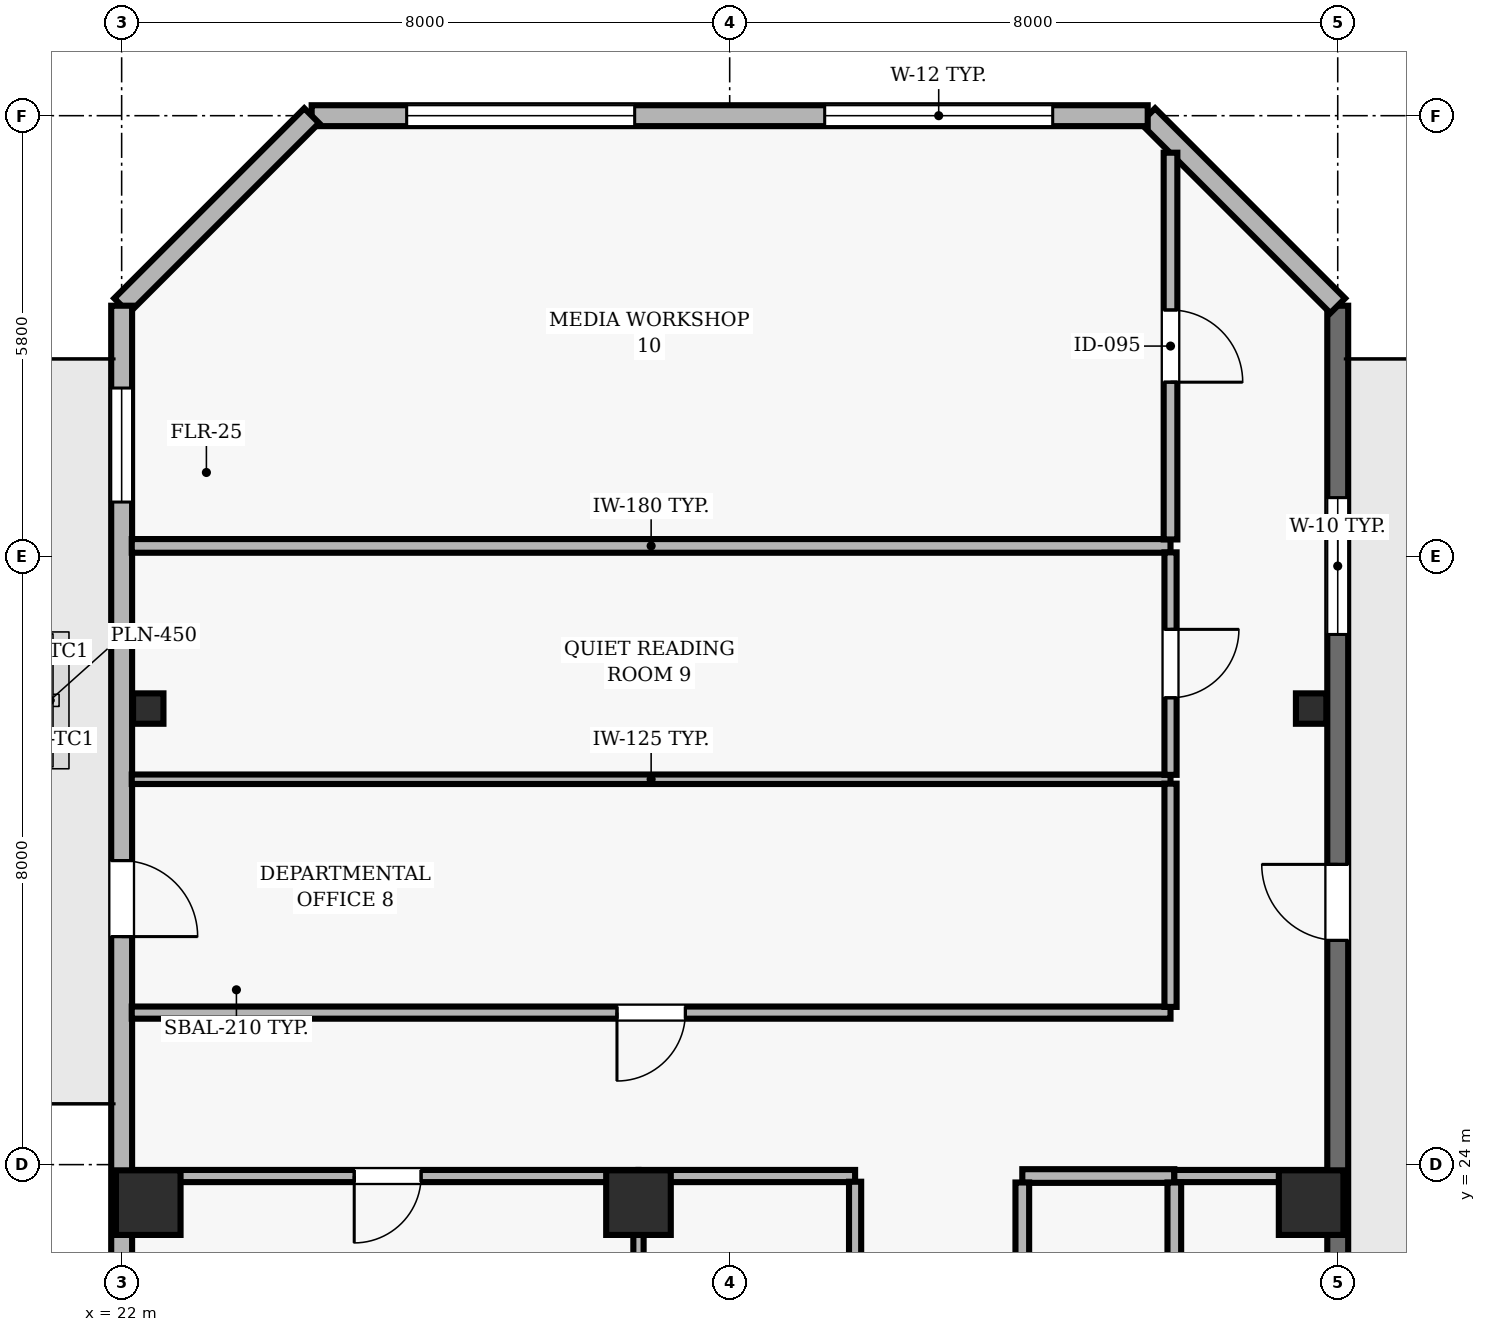
"""IFC4 building model, lengths in metres.
Left out: names, types, materials, properties, quantities, classifications, styles, units other than length and angle.
Written with IfcOpenShell. Run it as: python <this file> out.ifc"""

import sys

from ifc_helpers import new_model, si_unit, direction, frame, frame_2d, origin, origin_2d, place, context, subcontext, project, spatial, rectangle, hollow_rectangle, extrude, element, fill, save


model = new_model("IFC4")
c1 = context("Model", 3, precision=1e-05, world=origin(), true_north=direction((0.0, 1.0)))
c2 = subcontext(c1, "Body", "Model", "MODEL_VIEW")
j1 = project(units=[si_unit("LENGTHUNIT", "METRE"), si_unit("PLANEANGLEUNIT", "RADIAN")], contexts=[c1])
p1 = place(None, origin())
s1 = spatial("IfcSite", under=j1, at=p1, CompositionType="ELEMENT")
p2 = place(p1, origin())
s2 = spatial("IfcBuilding", under=s1, at=p2, CompositionType="ELEMENT")
p3 = place(p2, frame((0.0, 0.0, 298.9)))
s3 = spatial("IfcBuildingStorey", under=s2, at=p3, CompositionType="ELEMENT", Elevation=298.9)
for number, where, z_axis, x_axis in (
    (1, (22.35, 23.5, 0.0), (0.0, 0.0, 1.0), (1.0, 0.0, 0.0)),
    (2, (28.8, 23.5, 0.0), (0.0, 0.0, 1.0), (1.0, 0.0, 0.0)),
    (3, (37.65, 23.5, 0.0), (0.0, 0.0, 1.0), (1.0, 0.0, 0.0)),
):
    element("IfcColumn", number, at=place(p3, frame(where, z_axis=z_axis, x_axis=x_axis)), inside=s3, PredefinedType="COLUMN", context=c2, shape_type="SweptSolid", body=[
        extrude(rectangle(XDim=0.85, YDim=0.85, at=origin_2d()), origin(), (0.0, 0.0, 1.0), 3.9),
    ])
for number, where, z_axis, x_axis in (
    (4, (22.35, 30.0, 0.0), (0.0, 0.0, 1.0), (1.0, 0.0, 0.0)),
    (5, (37.65, 30.0, 0.0), (0.0, 0.0, 1.0), (1.0, 0.0, 0.0)),
):
    element("IfcColumn", number, at=place(p3, frame(where, z_axis=z_axis, x_axis=x_axis)), inside=s3, PredefinedType="COLUMN", context=c2, shape_type="SweptSolid", body=[
        extrude(hollow_rectangle(XDim=0.4, YDim=0.4, WallThickness=0.02, at=origin_2d()), origin(), (0.0, 0.0, 1.0), 3.9),
    ])
p4 = place(p3, frame((38.0, 21.6, 0.0), z_axis=(0.0, 0.0, 1.0), x_axis=(0.0, 1.0, 0.0)))
e6 = element("IfcWall", 6, at=p4, inside=s3, PredefinedType="SOLIDWALL", context=c2, shape_type="SweptSolid", body=[
    extrude(rectangle(XDim=13.7, YDim=0.275, at=frame_2d((6.85, 0.0))), origin(), (0.0, 0.0, 1.0), 3.69),
])
p5 = place(p4, frame((5.35, 0.0, 0.0)))
e7 = element("IfcOpeningElement", 7, at=p5, cuts=e6, PredefinedType="OPENING", context=c2, shape_type="SweptSolid", body=[
    extrude(rectangle(XDim=1.0, YDim=2.2, at=frame_2d((0.5, 1.1))), frame((0.0, 0.147, 0.0), z_axis=(0.0, -1.0, 0.0), x_axis=(1.0, 0.0, 0.0)), (0.0, 0.0, 1.0), 0.295),
])
p6 = place(p4, frame((9.375, 0.0, 0.9)))
e8 = element("IfcOpeningElement", 8, at=p6, cuts=e6, PredefinedType="OPENING", context=c2, shape_type="SweptSolid", body=[
    extrude(rectangle(XDim=1.8, YDim=2.2, at=frame_2d((0.9, 1.1))), frame((0.0, 0.147, 0.0), z_axis=(0.0, -1.0, 0.0), x_axis=(1.0, 0.0, 0.0)), (0.0, 0.0, 1.0), 0.295),
])
p7 = place(p3, frame((38.0, 35.3, 0.0), z_axis=(0.0, 0.0, 1.0), x_axis=(-0.707106781187, 0.707106781187, 0.0)))
e9 = element("IfcWall", 9, at=p7, inside=s3, PredefinedType="SOLIDWALL", context=c2, shape_type="SweptSolid", body=[
    extrude(rectangle(XDim=3.536, YDim=0.275, at=frame_2d((1.768, 0.0))), origin(), (0.0, 0.0, 1.0), 3.69),
])
p8 = place(p3, frame((35.5, 37.8, 0.0), z_axis=(0.0, 0.0, 1.0), x_axis=(-1.0, 0.0, 0.0)))
e10 = element("IfcWall", 10, at=p8, inside=s3, PredefinedType="SOLIDWALL", context=c2, shape_type="SweptSolid", body=[
    extrude(rectangle(XDim=11.0, YDim=0.275, at=frame_2d((5.5, 0.0))), origin(), (0.0, 0.0, 1.0), 3.69),
])
p9 = place(p8, frame((1.25, 0.0, 0.9)))
e11 = element("IfcOpeningElement", 11, at=p9, cuts=e10, PredefinedType="OPENING", context=c2, shape_type="SweptSolid", body=[
    extrude(rectangle(XDim=3.0, YDim=2.2, at=frame_2d((1.5, 1.1))), frame((0.0, 0.147, 0.0), z_axis=(0.0, -1.0, 0.0), x_axis=(1.0, 0.0, 0.0)), (0.0, 0.0, 1.0), 0.295),
])
p10 = place(p8, frame((6.75, 0.0, 0.9)))
e12 = element("IfcOpeningElement", 12, at=p10, cuts=e10, PredefinedType="OPENING", context=c2, shape_type="SweptSolid", body=[
    extrude(rectangle(XDim=3.0, YDim=2.2, at=frame_2d((1.5, 1.1))), frame((0.0, 0.147, 0.0), z_axis=(0.0, -1.0, 0.0), x_axis=(1.0, 0.0, 0.0)), (0.0, 0.0, 1.0), 0.295),
])
p11 = place(p3, frame((24.5, 37.8, 0.0), z_axis=(0.0, 0.0, 1.0), x_axis=(-0.707106781187, -0.707106781187, 0.0)))
e13 = element("IfcWall", 13, at=p11, inside=s3, PredefinedType="SOLIDWALL", context=c2, shape_type="SweptSolid", body=[
    extrude(rectangle(XDim=3.536, YDim=0.275, at=frame_2d((1.768, 0.0))), origin(), (0.0, 0.0, 1.0), 3.69),
])
p12 = place(p3, frame((22.0, 35.3, 0.0), z_axis=(0.0, 0.0, 1.0), x_axis=(0.0, -1.0, 0.0)))
e14 = element("IfcWall", 14, at=p12, inside=s3, PredefinedType="SOLIDWALL", context=c2, shape_type="SweptSolid", body=[
    extrude(rectangle(XDim=32.8, YDim=0.275, at=frame_2d((16.4, 0.0))), origin(), (0.0, 0.0, 1.0), 3.69),
])
p13 = place(p12, frame((7.3, 0.0, 0.0)))
e15 = element("IfcOpeningElement", 15, at=p13, cuts=e14, PredefinedType="OPENING", context=c2, shape_type="SweptSolid", body=[
    extrude(rectangle(XDim=1.0, YDim=2.2, at=frame_2d((0.5, 1.1))), frame((0.0, 0.147, 0.0), z_axis=(0.0, -1.0, 0.0), x_axis=(1.0, 0.0, 0.0)), (0.0, 0.0, 1.0), 0.295),
])
p14 = place(p12, frame((1.083, 0.0, 0.9)))
e16 = element("IfcOpeningElement", 16, at=p14, cuts=e14, PredefinedType="OPENING", context=c2, shape_type="SweptSolid", body=[
    extrude(rectangle(XDim=1.5, YDim=1.6, at=frame_2d((0.75, 0.8))), frame((0.0, 0.147, 0.0), z_axis=(0.0, -1.0, 0.0), x_axis=(1.0, 0.0, 0.0)), (0.0, 0.0, 1.0), 0.295),
])
p15 = place(p12, frame((12.917, 0.0, 0.9)))
e17 = element("IfcOpeningElement", 17, at=p15, cuts=e14, PredefinedType="OPENING", context=c2, shape_type="SweptSolid", body=[
    extrude(rectangle(XDim=1.5, YDim=1.6, at=frame_2d((0.75, 0.8))), frame((0.0, 0.147, 0.0), z_axis=(0.0, -1.0, 0.0), x_axis=(1.0, 0.0, 0.0)), (0.0, 0.0, 1.0), 0.295),
])
p16 = place(p12, frame((18.383, 0.0, 0.9)))
e18 = element("IfcOpeningElement", 18, at=p16, cuts=e14, PredefinedType="OPENING", context=c2, shape_type="SweptSolid", body=[
    extrude(rectangle(XDim=1.5, YDim=1.6, at=frame_2d((0.75, 0.8))), frame((0.0, 0.147, 0.0), z_axis=(0.0, -1.0, 0.0), x_axis=(1.0, 0.0, 0.0)), (0.0, 0.0, 1.0), 0.295),
])
p17 = place(p12, frame((23.85, 0.0, 0.9)))
e19 = element("IfcOpeningElement", 19, at=p17, cuts=e14, PredefinedType="OPENING", context=c2, shape_type="SweptSolid", body=[
    extrude(rectangle(XDim=1.5, YDim=1.6, at=frame_2d((0.75, 0.8))), frame((0.0, 0.147, 0.0), z_axis=(0.0, -1.0, 0.0), x_axis=(1.0, 0.0, 0.0)), (0.0, 0.0, 1.0), 0.295),
])
p18 = place(p3, frame((28.8, 23.85, 0.0), z_axis=(0.0, 0.0, 1.0), x_axis=(-1.0, 0.0, 0.0)))
e20 = element("IfcWall", 20, at=p18, inside=s3, PredefinedType="PARTITIONING", context=c2, shape_type="SweptSolid", body=[
    extrude(rectangle(XDim=6.6, YDim=0.16, at=frame_2d((3.3, 0.0))), origin(), (0.0, 0.0, 1.0), 3.227),
])
p19 = place(p18, frame((2.86, 0.0, 0.0)))
e21 = element("IfcOpeningElement", 21, at=p19, cuts=e20, PredefinedType="OPENING", context=c2, shape_type="SweptSolid", body=[
    extrude(rectangle(XDim=0.88, YDim=2.1, at=frame_2d((0.44, 1.05))), frame((0.0, 0.09, 0.0), z_axis=(0.0, -1.0, 0.0), x_axis=(1.0, 0.0, 0.0)), (0.0, 0.0, 1.0), 0.18),
])
p20 = place(p3, frame((31.65, 23.85, 0.0), z_axis=(0.0, 0.0, 1.0), x_axis=(-1.0, 0.0, 0.0)))
e22 = element("IfcWall", 22, at=p20, inside=s3, PredefinedType="PARTITIONING", context=c2, shape_type="SweptSolid", body=[
    extrude(rectangle(XDim=2.85, YDim=0.16, at=frame_2d((1.425, 0.0))), origin(), (0.0, 0.0, 1.0), 3.227),
])
p21 = place(p3, frame((35.8, 26.0, 0.0), z_axis=(0.0, 0.0, 1.0), x_axis=(-1.0, 0.0, 0.0)))
e23 = element("IfcWall", 23, at=p21, inside=s3, PredefinedType="PARTITIONING", context=c2, shape_type="SweptSolid", body=[
    extrude(rectangle(XDim=13.667, YDim=0.16, at=frame_2d((6.833, 0.0))), origin(), (0.0, 0.0, 1.0), 3.69),
])
p22 = place(p21, frame((6.383, 0.0, 0.0)))
e24 = element("IfcOpeningElement", 24, at=p22, cuts=e23, PredefinedType="OPENING", context=c2, shape_type="SweptSolid", body=[
    extrude(rectangle(XDim=0.9, YDim=2.1, at=frame_2d((0.45, 1.05))), frame((0.0, 0.09, 0.0), z_axis=(0.0, -1.0, 0.0), x_axis=(1.0, 0.0, 0.0)), (0.0, 0.0, 1.0), 0.18),
])
p23 = place(p3, frame((35.8, 29.07, 0.0), z_axis=(0.0, 0.0, 1.0), x_axis=(-1.0, 0.0, 0.0)))
e25 = element("IfcWall", 25, at=p23, inside=s3, PredefinedType="PARTITIONING", context=c2, shape_type="SweptSolid", body=[
    extrude(rectangle(XDim=13.667, YDim=0.125, at=frame_2d((6.833, 0.0))), origin(), (0.0, 0.0, 1.0), 3.69),
])
p24 = place(p3, frame((35.8, 32.14, 0.0), z_axis=(0.0, 0.0, 1.0), x_axis=(-1.0, 0.0, 0.0)))
e26 = element("IfcWall", 26, at=p24, inside=s3, PredefinedType="PARTITIONING", context=c2, shape_type="SweptSolid", body=[
    extrude(rectangle(XDim=13.667, YDim=0.18, at=frame_2d((6.833, 0.0))), origin(), (0.0, 0.0, 1.0), 3.69),
])
p25 = place(p3, frame((35.85, 23.85, 0.0), z_axis=(0.0, 0.0, 1.0), x_axis=(-1.0, 0.0, 0.0)))
e27 = element("IfcWall", 27, at=p25, inside=s3, PredefinedType="PARTITIONING", context=c2, shape_type="SweptSolid", body=[
    extrude(rectangle(XDim=2.0, YDim=0.18, at=frame_2d((1.0, 0.0))), origin(), (0.0, 0.0, 1.0), 3.227),
])
p26 = place(p3, frame((37.85, 23.85, 0.0), z_axis=(0.0, 0.0, 1.0), x_axis=(-1.0, 0.0, 0.0)))
e28 = element("IfcWall", 28, at=p26, inside=s3, PredefinedType="PARTITIONING", context=c2, shape_type="SweptSolid", body=[
    extrude(rectangle(XDim=2.0, YDim=0.16, at=frame_2d((1.0, 0.0))), origin(), (0.0, 0.0, 1.0), 3.227),
])
p27 = place(p3, frame((28.8, 23.775, 0.0), z_axis=(0.0, 0.0, 1.0), x_axis=(0.0, -1.0, 0.0)))
e29 = element("IfcWall", 29, at=p27, inside=s3, PredefinedType="PARTITIONING", context=c2, shape_type="SweptSolid", body=[
    extrude(rectangle(XDim=4.615, YDim=0.135, at=frame_2d((2.308, 0.0))), origin(), (0.0, 0.0, 1.0), 3.69),
])
p28 = place(p3, frame((31.65, 19.01, 0.0), z_axis=(0.0, 0.0, 1.0), x_axis=(0.0, 1.0, 0.0)))
e30 = element("IfcWall", 30, at=p28, inside=s3, PredefinedType="PARTITIONING", context=c2, shape_type="SweptSolid", body=[
    extrude(rectangle(XDim=4.765, YDim=0.16, at=frame_2d((2.382, 0.0))), origin(), (0.0, 0.0, 1.0), 3.69),
])
p29 = place(p28, frame((1.932, 0.0, 0.0)))
e31 = element("IfcOpeningElement", 31, at=p29, cuts=e30, PredefinedType="OPENING", context=c2, shape_type="SweptSolid", body=[
    extrude(rectangle(XDim=0.9, YDim=2.1, at=frame_2d((0.45, 1.05))), frame((0.0, 0.09, 0.0), z_axis=(0.0, -1.0, 0.0), x_axis=(1.0, 0.0, 0.0)), (0.0, 0.0, 1.0), 0.18),
])
p30 = place(p3, frame((33.85, 17.735, 0.0), z_axis=(0.0, 0.0, 1.0), x_axis=(0.0, 1.0, 0.0)))
e32 = element("IfcWall", 32, at=p30, inside=s3, PredefinedType="PARTITIONING", context=c2, shape_type="SweptSolid", body=[
    extrude(rectangle(XDim=6.03, YDim=0.18, at=frame_2d((3.015, 0.0))), origin(), (0.0, 0.0, 1.0), 3.69),
])
p31 = place(p30, frame((2.54, 0.0, 0.0)))
e33 = element("IfcOpeningElement", 33, at=p31, cuts=e32, PredefinedType="OPENING", context=c2, shape_type="SweptSolid", body=[
    extrude(rectangle(XDim=0.95, YDim=2.1, at=frame_2d((0.475, 1.05))), frame((0.0, 0.1, 0.0), z_axis=(0.0, -1.0, 0.0), x_axis=(1.0, 0.0, 0.0)), (0.0, 0.0, 1.0), 0.2),
])
p32 = place(p3, frame((35.8, 29.012, 0.0), z_axis=(0.0, 0.0, 1.0), x_axis=(0.0, -1.0, 0.0)))
e34 = element("IfcWall", 34, at=p32, inside=s3, PredefinedType="PARTITIONING", context=c2, shape_type="SweptSolid", body=[
    extrude(rectangle(XDim=2.937, YDim=0.16, at=frame_2d((1.469, 0.0))), origin(), (0.0, 0.0, 1.0), 3.69),
])
p33 = place(p3, frame((35.8, 32.055, 0.0), z_axis=(0.0, 0.0, 1.0), x_axis=(0.0, -1.0, 0.0)))
e35 = element("IfcWall", 35, at=p33, inside=s3, PredefinedType="PARTITIONING", context=c2, shape_type="SweptSolid", body=[
    extrude(rectangle(XDim=2.927, YDim=0.16, at=frame_2d((1.463, 0.0))), origin(), (0.0, 0.0, 1.0), 3.69),
])
p34 = place(p33, frame((1.013, 0.0, 0.0)))
e36 = element("IfcOpeningElement", 36, at=p34, cuts=e35, PredefinedType="OPENING", context=c2, shape_type="SweptSolid", body=[
    extrude(rectangle(XDim=0.9, YDim=2.1, at=frame_2d((0.45, 1.05))), frame((0.0, 0.09, 0.0), z_axis=(0.0, -1.0, 0.0), x_axis=(1.0, 0.0, 0.0)), (0.0, 0.0, 1.0), 0.18),
])
p35 = place(p3, frame((35.8, 37.313, 0.0), z_axis=(0.0, 0.0, 1.0), x_axis=(0.0, -1.0, 0.0)))
e37 = element("IfcWall", 37, at=p35, inside=s3, PredefinedType="PARTITIONING", context=c2, shape_type="SweptSolid", body=[
    extrude(rectangle(XDim=5.088, YDim=0.18, at=frame_2d((2.544, 0.0))), origin(), (0.0, 0.0, 1.0), 3.69),
])
p36 = place(p35, frame((2.069, 0.0, 0.0)))
e38 = element("IfcOpeningElement", 38, at=p36, cuts=e37, PredefinedType="OPENING", context=c2, shape_type="SweptSolid", body=[
    extrude(rectangle(XDim=0.95, YDim=2.1, at=frame_2d((0.475, 1.05))), frame((0.0, 0.1, 0.0), z_axis=(0.0, -1.0, 0.0), x_axis=(1.0, 0.0, 0.0)), (0.0, 0.0, 1.0), 0.2),
])
p37 = place(p3, frame((35.85, 21.258, 0.0), z_axis=(0.0, 0.0, 1.0), x_axis=(0.0, 1.0, 0.0)))
e39 = element("IfcWall", 39, at=p37, inside=s3, PredefinedType="PARTITIONING", context=c2, shape_type="SweptSolid", body=[
    extrude(rectangle(XDim=2.507, YDim=0.18, at=frame_2d((1.253, 0.0))), origin(), (0.0, 0.0, 1.0), 3.69),
])
p38 = place(p37, frame((0.454, 0.0, 0.0)))
e40 = element("IfcOpeningElement", 40, at=p38, cuts=e39, PredefinedType="OPENING", context=c2, shape_type="SweptSolid", body=[
    extrude(rectangle(XDim=0.9, YDim=2.1, at=frame_2d((0.45, 1.05))), frame((0.0, 0.1, 0.0), z_axis=(0.0, -1.0, 0.0), x_axis=(1.0, 0.0, 0.0)), (0.0, 0.0, 1.0), 0.2),
])
p39 = place(p5, origin())
e41 = element("IfcDoor", 41, at=p39, inside=s3, OperationType="SINGLE_SWING_RIGHT", PredefinedType="DOOR", context=c2, shape_type="SweptSolid", body=[
    extrude(rectangle(XDim=1.0, YDim=2.2, at=frame_2d((0.5, 1.1))), frame((0.0, 0.025, 0.0), z_axis=(0.0, -1.0, 0.0), x_axis=(1.0, 0.0, 0.0)), (0.0, 0.0, 1.0), 0.05),
])
fill(e7, e41)
p40 = place(p6, origin())
e42 = element("IfcWindow", 42, at=p40, inside=s3, PartitioningType="SINGLE_PANEL", PredefinedType="WINDOW", context=c2, shape_type="SweptSolid", body=[
    extrude(rectangle(XDim=1.8, YDim=2.2, at=frame_2d((0.9, 1.1))), frame((0.0, 0.03, 0.0), z_axis=(0.0, -1.0, 0.0), x_axis=(1.0, 0.0, 0.0)), (0.0, 0.0, 1.0), 0.06),
])
fill(e8, e42)
p41 = place(p9, origin())
e43 = element("IfcWindow", 43, at=p41, inside=s3, PartitioningType="SINGLE_PANEL", PredefinedType="WINDOW", context=c2, shape_type="SweptSolid", body=[
    extrude(rectangle(XDim=3.0, YDim=2.2, at=frame_2d((1.5, 1.1))), frame((0.0, 0.03, 0.0), z_axis=(0.0, -1.0, 0.0), x_axis=(1.0, 0.0, 0.0)), (0.0, 0.0, 1.0), 0.06),
])
fill(e11, e43)
p42 = place(p10, origin())
e44 = element("IfcWindow", 44, at=p42, inside=s3, PartitioningType="SINGLE_PANEL", PredefinedType="WINDOW", context=c2, shape_type="SweptSolid", body=[
    extrude(rectangle(XDim=3.0, YDim=2.2, at=frame_2d((1.5, 1.1))), frame((0.0, 0.03, 0.0), z_axis=(0.0, -1.0, 0.0), x_axis=(1.0, 0.0, 0.0)), (0.0, 0.0, 1.0), 0.06),
])
fill(e12, e44)
p43 = place(p13, origin())
e45 = element("IfcDoor", 45, at=p43, inside=s3, OperationType="SINGLE_SWING_RIGHT", PredefinedType="DOOR", context=c2, shape_type="SweptSolid", body=[
    extrude(rectangle(XDim=1.0, YDim=2.2, at=frame_2d((0.5, 1.1))), frame((0.0, 0.025, 0.0), z_axis=(0.0, -1.0, 0.0), x_axis=(1.0, 0.0, 0.0)), (0.0, 0.0, 1.0), 0.05),
])
fill(e15, e45)
p44 = place(p14, origin())
e46 = element("IfcWindow", 46, at=p44, inside=s3, PartitioningType="SINGLE_PANEL", PredefinedType="WINDOW", context=c2, shape_type="SweptSolid", body=[
    extrude(rectangle(XDim=1.5, YDim=1.6, at=frame_2d((0.75, 0.8))), frame((0.0, 0.03, 0.0), z_axis=(0.0, -1.0, 0.0), x_axis=(1.0, 0.0, 0.0)), (0.0, 0.0, 1.0), 0.06),
])
fill(e16, e46)
p45 = place(p19, origin())
e47 = element("IfcDoor", 47, at=p45, inside=s3, OperationType="SINGLE_SWING_RIGHT", PredefinedType="DOOR", context=c2, shape_type="SweptSolid", body=[
    extrude(rectangle(XDim=0.88, YDim=2.1, at=frame_2d((0.44, 1.05))), frame((0.0, 0.025, 0.0), z_axis=(0.0, -1.0, 0.0), x_axis=(1.0, 0.0, 0.0)), (0.0, 0.0, 1.0), 0.05),
])
fill(e21, e47)
p46 = place(p22, origin())
e48 = element("IfcDoor", 48, at=p46, inside=s3, OperationType="SINGLE_SWING_RIGHT", PredefinedType="DOOR", context=c2, shape_type="SweptSolid", body=[
    extrude(rectangle(XDim=0.9, YDim=2.1, at=frame_2d((0.45, 1.05))), frame((0.0, 0.025, 0.0), z_axis=(0.0, -1.0, 0.0), x_axis=(1.0, 0.0, 0.0)), (0.0, 0.0, 1.0), 0.05),
])
fill(e24, e48)
p47 = place(p34, origin())
e49 = element("IfcDoor", 49, at=p47, inside=s3, OperationType="SINGLE_SWING_LEFT", PredefinedType="DOOR", context=c2, shape_type="SweptSolid", body=[
    extrude(rectangle(XDim=0.9, YDim=2.1, at=frame_2d((0.45, 1.05))), frame((0.0, 0.025, 0.0), z_axis=(0.0, -1.0, 0.0), x_axis=(1.0, 0.0, 0.0)), (0.0, 0.0, 1.0), 0.05),
])
fill(e36, e49)
p48 = place(p36, origin())
e50 = element("IfcDoor", 50, at=p48, inside=s3, OperationType="SINGLE_SWING_RIGHT", PredefinedType="DOOR", context=c2, shape_type="SweptSolid", body=[
    extrude(rectangle(XDim=0.95, YDim=2.1, at=frame_2d((0.475, 1.05))), frame((0.0, 0.025, 0.0), z_axis=(0.0, -1.0, 0.0), x_axis=(1.0, 0.0, 0.0)), (0.0, 0.0, 1.0), 0.05),
])
fill(e38, e50)
save(model, sys.argv[1])
